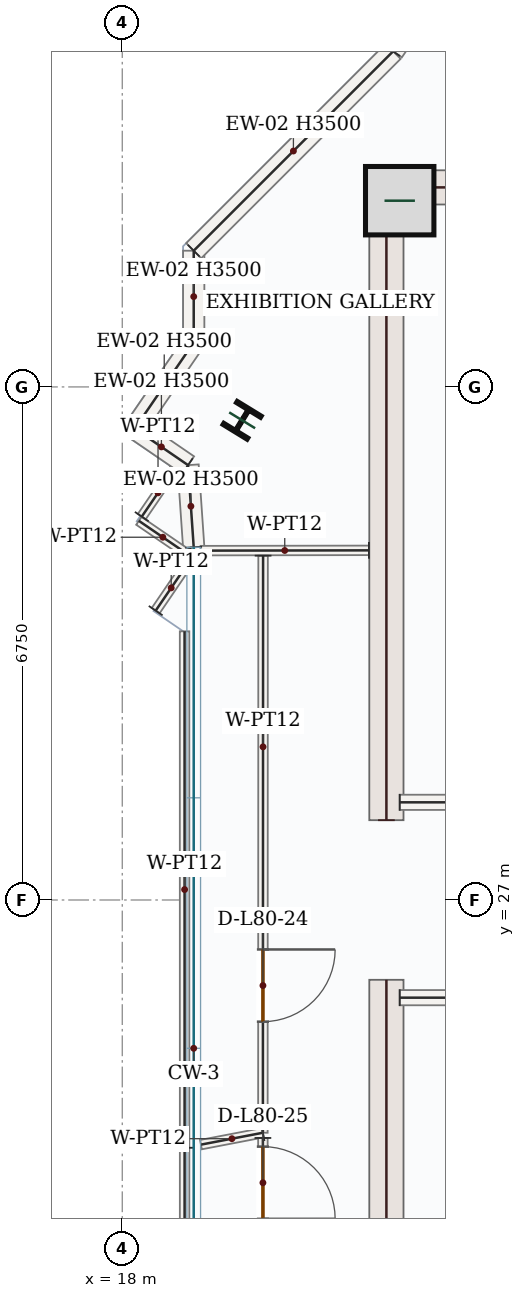
"""IFC4 building model, lengths in metres.
Left out: names, types, materials, properties, quantities, classifications, styles, units other than length and angle.
Written with IfcOpenShell. Run it as: python <this file> out.ifc"""

import sys

from ifc_helpers import new_model, si_unit, direction, frame, frame_2d, origin, origin_2d, place, context, subcontext, project, spatial, rectangle, i_section, extrude, source, transform, mapped, element, fill, save


model = new_model("IFC4")
c1 = context("Model", 3, precision=1e-05, world=origin(), true_north=direction((0.0, 1.0)))
c2 = subcontext(c1, "Body", "Model", "MODEL_VIEW")
j1 = project(units=[si_unit("LENGTHUNIT", "METRE"), si_unit("PLANEANGLEUNIT", "RADIAN")], contexts=[c1])
p1 = place(None, origin())
s1 = spatial("IfcSite", under=j1, at=p1, CompositionType="ELEMENT")
p2 = place(p1, origin())
s2 = spatial("IfcBuilding", under=s1, at=p2, CompositionType="ELEMENT")
p3 = place(p2, frame((0.0, 0.0, 331.05)))
s3 = spatial("IfcBuildingStorey", under=s2, at=p3, CompositionType="ELEMENT", Elevation=331.05)
m1 = source(origin(), c2, "Body", "SweptSolid", [
    extrude(rectangle(XDim=8.55, YDim=0.45, at=frame_2d((4.275, 0.0))), origin(), (0.0, 0.0, 1.0), 3.5),
])
for number, where, z_axis, x_axis in (
    (1, (21.475, 17.4, 0.0), (0.0, 0.0, 1.0), (0.0, 1.0, 0.0)),
    (2, (21.475, 28.05, 0.0), (0.0, 0.0, 1.0), (0.0, 1.0, 0.0)),
):
    element("IfcWall", number, at=place(p3, frame(where, z_axis=z_axis, x_axis=x_axis)), inside=s3, PredefinedType="SHEAR", context=c2, shape_type="MappedRepresentation", body=[
        mapped(m1, transform((0.0, 0.0, 0.0), x_axis=(1.0, 0.0, 0.0), y_axis=(0.0, 1.0, 0.0), z_axis=(0.0, 0.0, 1.0), scale=1.0)),
    ])
m2 = source(origin(), c2, "Body", "SweptSolid", [
    extrude(rectangle(XDim=7.1, YDim=0.45, at=frame_2d((3.55, 0.0))), origin(), (0.0, 0.0, 1.0), 3.5),
])
p4 = place(p3, frame((21.7, 36.375, 0.0), z_axis=(0.0, 0.0, 1.0), x_axis=(1.0, 0.0, 0.0)))
e3 = element("IfcWall", 3, at=p4, inside=s3, PredefinedType="SHEAR", context=c2, shape_type="MappedRepresentation", body=[
    mapped(m2, transform((0.0, 0.0, 0.0), x_axis=(1.0, 0.0, 0.0), y_axis=(0.0, 1.0, 0.0), z_axis=(0.0, 0.0, 1.0), scale=1.0)),
])
m3 = source(origin(), c2, "Body", "SweptSolid", [
    extrude(rectangle(XDim=0.9, YDim=0.9, at=origin_2d()), origin(), (0.0, 0.0, 1.0), 3.75),
])
p5 = place(p3, frame((21.65, 36.2, 0.0), z_axis=(0.0, 0.0, 1.0), x_axis=(1.0, 0.0, 0.0)))
e4 = element("IfcColumn", 4, at=p5, inside=s3, PredefinedType="COLUMN", context=c2, shape_type="MappedRepresentation", body=[
    mapped(m3, transform((0.0, 0.0, 0.0), x_axis=(1.0, 0.0, 0.0), y_axis=(0.0, 1.0, 0.0), z_axis=(0.0, 0.0, 1.0), scale=1.0)),
])
m4 = source(origin(), c2, "Body", "SweptSolid", [
    extrude(i_section(OverallWidth=0.369, OverallDepth=0.356, WebThickness=0.011, FlangeThickness=0.018, FilletRadius=0.018, at=origin_2d()), origin(), (0.0, 0.0, 1.0), 3.75),
])
p6 = place(p3, frame((19.577, 33.311, 0.0), z_axis=(0.0, 0.0, 1.0), x_axis=(-0.852640164354, 0.522498564716, 0.0)))
e5 = element("IfcColumn", 5, at=p6, inside=s3, PredefinedType="COLUMN", context=c2, shape_type="MappedRepresentation", body=[
    mapped(m4, transform((0.0, 0.0, 0.0), x_axis=(1.0, 0.0, 0.0), y_axis=(0.0, 1.0, 0.0), z_axis=(0.0, 0.0, 1.0), scale=1.0)),
])
m5 = source(origin(), c2, "Body", "SweptSolid", [
    extrude(rectangle(XDim=1.083, YDim=0.28, at=frame_2d((0.542, 0.0))), origin(), (0.0, 0.0, 1.0), 3.5),
])
p7 = place(p3, frame((18.94, 31.64, 0.0), z_axis=(0.0, 0.0, 1.0), x_axis=(-0.068717036618, 0.997636190642, 0.0)))
e6 = element("IfcWall", 6, at=p7, inside=s3, PredefinedType="SOLIDWALL", context=c2, shape_type="MappedRepresentation", body=[
    mapped(m5, transform((0.0, 0.0, 0.0), x_axis=(1.0, 0.0, 0.0), y_axis=(0.0, 1.0, 0.0), z_axis=(0.0, 0.0, 1.0), scale=1.0)),
])
m6 = source(origin(), c2, "Body", "SweptSolid", [
    extrude(rectangle(XDim=0.85, YDim=0.28, at=frame_2d((0.425, 0.0))), origin(), (0.0, 0.0, 1.0), 3.5),
])
p8 = place(p3, frame((18.865, 32.721, 0.0), z_axis=(0.0, 0.0, 1.0), x_axis=(-0.825046459993, 0.565064897913, 0.0)))
e7 = element("IfcWall", 7, at=p8, inside=s3, PredefinedType="SOLIDWALL", context=c2, shape_type="MappedRepresentation", body=[
    mapped(m6, transform((0.0, 0.0, 0.0), x_axis=(1.0, 0.0, 0.0), y_axis=(0.0, 1.0, 0.0), z_axis=(0.0, 0.0, 1.0), scale=1.0)),
])
m7 = source(origin(), c2, "Body", "SweptSolid", [
    extrude(rectangle(XDim=1.373, YDim=0.28, at=frame_2d((0.687, 0.0))), origin(), (0.0, 0.0, 1.0), 3.5),
])
p9 = place(p3, frame((18.164, 33.201, 0.0), z_axis=(0.0, 0.0, 1.0), x_axis=(0.564875120833, 0.825176404088, 0.0)))
e8 = element("IfcWall", 8, at=p9, inside=s3, PredefinedType="SOLIDWALL", context=c2, shape_type="MappedRepresentation", body=[
    mapped(m7, transform((0.0, 0.0, 0.0), x_axis=(1.0, 0.0, 0.0), y_axis=(0.0, 1.0, 0.0), z_axis=(0.0, 0.0, 1.0), scale=1.0)),
])
m8 = source(origin(), c2, "Body", "SweptSolid", [
    extrude(rectangle(XDim=1.208, YDim=0.28, at=frame_2d((0.604, 0.0))), origin(), (0.0, 0.0, 1.0), 3.5),
])
p10 = place(p3, frame((18.94, 34.334, 0.0), z_axis=(0.0, 0.0, 1.0), x_axis=(0.0, 1.0, 0.0)))
e9 = element("IfcWall", 9, at=p10, inside=s3, PredefinedType="SOLIDWALL", context=c2, shape_type="MappedRepresentation", body=[
    mapped(m8, transform((0.0, 0.0, 0.0), x_axis=(1.0, 0.0, 0.0), y_axis=(0.0, 1.0, 0.0), z_axis=(0.0, 0.0, 1.0), scale=1.0)),
])
m9 = source(origin(), c2, "Body", "SweptSolid", [
    extrude(rectangle(XDim=3.709, YDim=0.28, at=frame_2d((1.855, 0.0))), origin(), (0.0, 0.0, 1.0), 3.5),
])
p11 = place(p3, frame((18.94, 35.542, 0.0), z_axis=(0.0, 0.0, 1.0), x_axis=(0.707106781187, 0.707106781187, 0.0)))
e10 = element("IfcWall", 10, at=p11, inside=s3, PredefinedType="SOLIDWALL", context=c2, shape_type="MappedRepresentation", body=[
    mapped(m9, transform((0.0, 0.0, 0.0), x_axis=(1.0, 0.0, 0.0), y_axis=(0.0, 1.0, 0.0), z_axis=(0.0, 0.0, 1.0), scale=1.0)),
])
p12 = place(p3, frame((21.563, 38.165, 0.0), z_axis=(0.0, 0.0, 1.0), x_axis=(0.564961879511, 0.825117006672, 0.0)))
e11 = element("IfcWall", 11, at=p12, inside=s3, PredefinedType="SOLIDWALL", context=c2, shape_type="SweptSolid", body=[
    extrude(rectangle(XDim=3.904, YDim=0.28, at=frame_2d((1.952, 0.0))), origin(), (0.0, 0.0, 1.0), 3.5),
])
p13 = place(p12, frame((1.202, 0.0, 0.85)))
e12 = element("IfcOpeningElement", 12, at=p13, cuts=e11, PredefinedType="OPENING", context=c2, shape_type="SweptSolid", body=[
    extrude(rectangle(XDim=1.5, YDim=1.5, at=frame_2d((0.75, 0.75))), frame((0.0, 0.15, 0.0), z_axis=(0.0, -1.0, 0.0), x_axis=(1.0, 0.0, 0.0)), (0.0, 0.0, 1.0), 0.3),
])
m10 = source(origin(), c2, "Body", "SweptSolid", [
    extrude(rectangle(XDim=4.25, YDim=0.2, at=frame_2d((2.125, 0.0))), origin(), (0.0, 0.0, 1.0), 3.5),
])
for number, where, z_axis, x_axis in (
    (13, (21.65, 25.715, 0.0), (0.0, 0.0, 1.0), (1.0, 0.0, 0.0)),
    (14, (21.65, 28.285, 0.0), (0.0, 0.0, 1.0), (1.0, 0.0, 0.0)),
):
    element("IfcWall", number, at=place(p3, frame(where, z_axis=z_axis, x_axis=x_axis)), inside=s3, PredefinedType="SOLIDWALL", context=c2, shape_type="MappedRepresentation", body=[
        mapped(m10, transform((0.0, 0.0, 0.0), x_axis=(1.0, 0.0, 0.0), y_axis=(0.0, 1.0, 0.0), z_axis=(0.0, 0.0, 1.0), scale=1.0)),
    ])
m11 = source(origin(), c2, "Body", "SweptSolid", [
    extrude(rectangle(XDim=2.215, YDim=0.125, at=frame_2d((1.107, 0.0))), origin(), (0.0, 0.0, 1.0), 3.5),
])
p14 = place(p3, frame((21.245, 31.6, 0.0), z_axis=(0.0, 0.0, 1.0), x_axis=(-0.999998633374, -0.001653254657, 0.0)))
e15 = element("IfcWall", 15, at=p14, inside=s3, PredefinedType="PARTITIONING", context=c2, shape_type="MappedRepresentation", body=[
    mapped(m11, transform((0.0, 0.0, 0.0), x_axis=(1.0, 0.0, 0.0), y_axis=(0.0, 1.0, 0.0), z_axis=(0.0, 0.0, 1.0), scale=1.0)),
])
p15 = place(p3, frame((19.853, 31.53, 0.0), z_axis=(0.0, 0.0, 1.0), x_axis=(-0.000321574412, -0.999999948295, 0.0)))
e16 = element("IfcWall", 16, at=p15, inside=s3, PredefinedType="PARTITIONING", context=c2, shape_type="SweptSolid", body=[
    extrude(rectangle(XDim=7.592, YDim=0.125, at=frame_2d((3.796, 0.0))), origin(), (0.0, 0.0, 1.0), 3.5),
])
p16 = place(p15, frame((5.181, 0.0, 0.0)))
e17 = element("IfcOpeningElement", 17, at=p16, cuts=e16, PredefinedType="OPENING", context=c2, shape_type="SweptSolid", body=[
    extrude(rectangle(XDim=0.95, YDim=2.15, at=frame_2d((0.475, 1.075))), frame((0.0, 0.073, 0.0), z_axis=(0.0, -1.0, 0.0), x_axis=(1.0, 0.0, 0.0)), (0.0, 0.0, 1.0), 0.145),
])
m12 = source(origin(), c2, "Body", "SweptSolid", [
    extrude(rectangle(XDim=0.83, YDim=0.125, at=frame_2d((0.415, 0.0))), origin(), (0.0, 0.0, 1.0), 3.5),
])
p17 = place(p3, frame((19.85, 23.938, 0.0), z_axis=(0.0, 0.0, 1.0), x_axis=(-0.98205677528, -0.188585498189, 0.0)))
e18 = element("IfcWall", 18, at=p17, inside=s3, PredefinedType="PARTITIONING", context=c2, shape_type="MappedRepresentation", body=[
    mapped(m12, transform((0.0, 0.0, 0.0), x_axis=(1.0, 0.0, 0.0), y_axis=(0.0, 1.0, 0.0), z_axis=(0.0, 0.0, 1.0), scale=1.0)),
])
m13 = source(origin(), c2, "Body", "SweptSolid", [
    extrude(rectangle(XDim=6.795, YDim=0.125, at=frame_2d((3.397, 0.0))), origin(), (0.0, 0.0, 1.0), 3.5),
])
p18 = place(p3, frame((18.82, 23.74, 0.0), z_axis=(0.0, 0.0, 1.0), x_axis=(-7.1862312e-05, 0.999999997418, 0.0)))
e19 = element("IfcWall", 19, at=p18, inside=s3, PredefinedType="PARTITIONING", context=c2, shape_type="MappedRepresentation", body=[
    mapped(m13, transform((0.0, 0.0, 0.0), x_axis=(1.0, 0.0, 0.0), y_axis=(0.0, 1.0, 0.0), z_axis=(0.0, 0.0, 1.0), scale=1.0)),
])
m14 = source(origin(), c2, "Body", "SweptSolid", [
    extrude(rectangle(XDim=0.725, YDim=0.125, at=frame_2d((0.362, 0.0))), origin(), (0.0, 0.0, 1.0), 3.5),
])
p19 = place(p3, frame((18.44, 30.807, 0.0), z_axis=(0.0, 0.0, 1.0), x_axis=(0.563221841823, 0.826305728464, 0.0)))
e20 = element("IfcWall", 20, at=p19, inside=s3, PredefinedType="PARTITIONING", context=c2, shape_type="MappedRepresentation", body=[
    mapped(m14, transform((0.0, 0.0, 0.0), x_axis=(1.0, 0.0, 0.0), y_axis=(0.0, 1.0, 0.0), z_axis=(0.0, 0.0, 1.0), scale=1.0)),
])
m15 = source(origin(), c2, "Body", "SweptSolid", [
    extrude(rectangle(XDim=0.764, YDim=0.125, at=frame_2d((0.382, 0.0))), origin(), (0.0, 0.0, 1.0), 3.5),
])
p20 = place(p3, frame((18.849, 31.557, 0.0), z_axis=(0.0, 0.0, 1.0), x_axis=(-0.82520537731, 0.564832794071, 0.0)))
e21 = element("IfcWall", 21, at=p20, inside=s3, PredefinedType="PARTITIONING", context=c2, shape_type="MappedRepresentation", body=[
    mapped(m15, transform((0.0, 0.0, 0.0), x_axis=(1.0, 0.0, 0.0), y_axis=(0.0, 1.0, 0.0), z_axis=(0.0, 0.0, 1.0), scale=1.0)),
])
m16 = source(origin(), c2, "Body", "SweptSolid", [
    extrude(rectangle(XDim=0.757, YDim=0.125, at=frame_2d((0.379, 0.0))), origin(), (0.0, 0.0, 1.0), 3.5),
])
p21 = place(p3, frame((18.257, 32.044, 0.0), z_axis=(0.0, 0.0, 1.0), x_axis=(0.564406554972, 0.825496965896, 0.0)))
e22 = element("IfcWall", 22, at=p21, inside=s3, PredefinedType="PARTITIONING", context=c2, shape_type="MappedRepresentation", body=[
    mapped(m16, transform((0.0, 0.0, 0.0), x_axis=(1.0, 0.0, 0.0), y_axis=(0.0, 1.0, 0.0), z_axis=(0.0, 0.0, 1.0), scale=1.0)),
])
p22 = place(p3, frame((19.85, 23.869, 0.0), z_axis=(0.0, 0.0, 1.0), x_axis=(0.000665004009, -0.999999778885, 0.0)))
e23 = element("IfcWall", 23, at=p22, inside=s3, PredefinedType="PARTITIONING", context=c2, shape_type="SweptSolid", body=[
    extrude(rectangle(XDim=1.469, YDim=0.125, at=frame_2d((0.734, 0.0))), origin(), (0.0, 0.0, 1.0), 3.5),
])
p23 = place(p22, frame((0.114, 0.0, 0.0)))
e24 = element("IfcOpeningElement", 24, at=p23, cuts=e23, PredefinedType="OPENING", context=c2, shape_type="SweptSolid", body=[
    extrude(rectangle(XDim=0.95, YDim=2.15, at=frame_2d((0.475, 1.075))), frame((0.0, 0.073, 0.0), z_axis=(0.0, -1.0, 0.0), x_axis=(1.0, 0.0, 0.0)), (0.0, 0.0, 1.0), 0.145),
])
m17 = source(origin(), c2, "Body", "SweptSolid", [
    extrude(rectangle(XDim=5.332, YDim=0.125, at=frame_2d((2.666, 0.0))), origin(), (0.0, 0.0, 1.0), 3.5),
])
p24 = place(p3, frame((18.82, 18.408, 0.0), z_axis=(0.0, 0.0, 1.0), x_axis=(0.0, 1.0, 0.0)))
e25 = element("IfcWall", 25, at=p24, inside=s3, PredefinedType="PARTITIONING", context=c2, shape_type="MappedRepresentation", body=[
    mapped(m17, transform((0.0, 0.0, 0.0), x_axis=(1.0, 0.0, 0.0), y_axis=(0.0, 1.0, 0.0), z_axis=(0.0, 0.0, 1.0), scale=1.0)),
])
m18 = source(origin(), c2, "Body", "SweptSolid", [
    extrude(rectangle(XDim=0.95, YDim=2.15, at=frame_2d((0.475, 1.075))), frame((0.0, 0.025, 0.0), z_axis=(0.0, -1.0, 0.0), x_axis=(1.0, 0.0, 0.0)), (0.0, 0.0, 1.0), 0.05),
])
p25 = place(p16, origin())
e26 = element("IfcDoor", 26, at=p25, inside=s3, OperationType="SINGLE_SWING_LEFT", PredefinedType="DOOR", context=c2, shape_type="MappedRepresentation", body=[
    mapped(m18, transform((0.0, 0.0, 0.0), x_axis=(1.0, 0.0, 0.0), y_axis=(0.0, 1.0, 0.0), z_axis=(0.0, 0.0, 1.0), scale=1.0)),
])
fill(e17, e26)
p26 = place(p23, origin())
e27 = element("IfcDoor", 27, at=p26, inside=s3, OperationType="SINGLE_SWING_RIGHT", PredefinedType="DOOR", context=c2, shape_type="MappedRepresentation", body=[
    mapped(m18, transform((0.0, 0.0, 0.0), x_axis=(1.0, 0.0, 0.0), y_axis=(0.0, 1.0, 0.0), z_axis=(0.0, 0.0, 1.0), scale=1.0)),
])
fill(e24, e27)
save(model, sys.argv[1])
